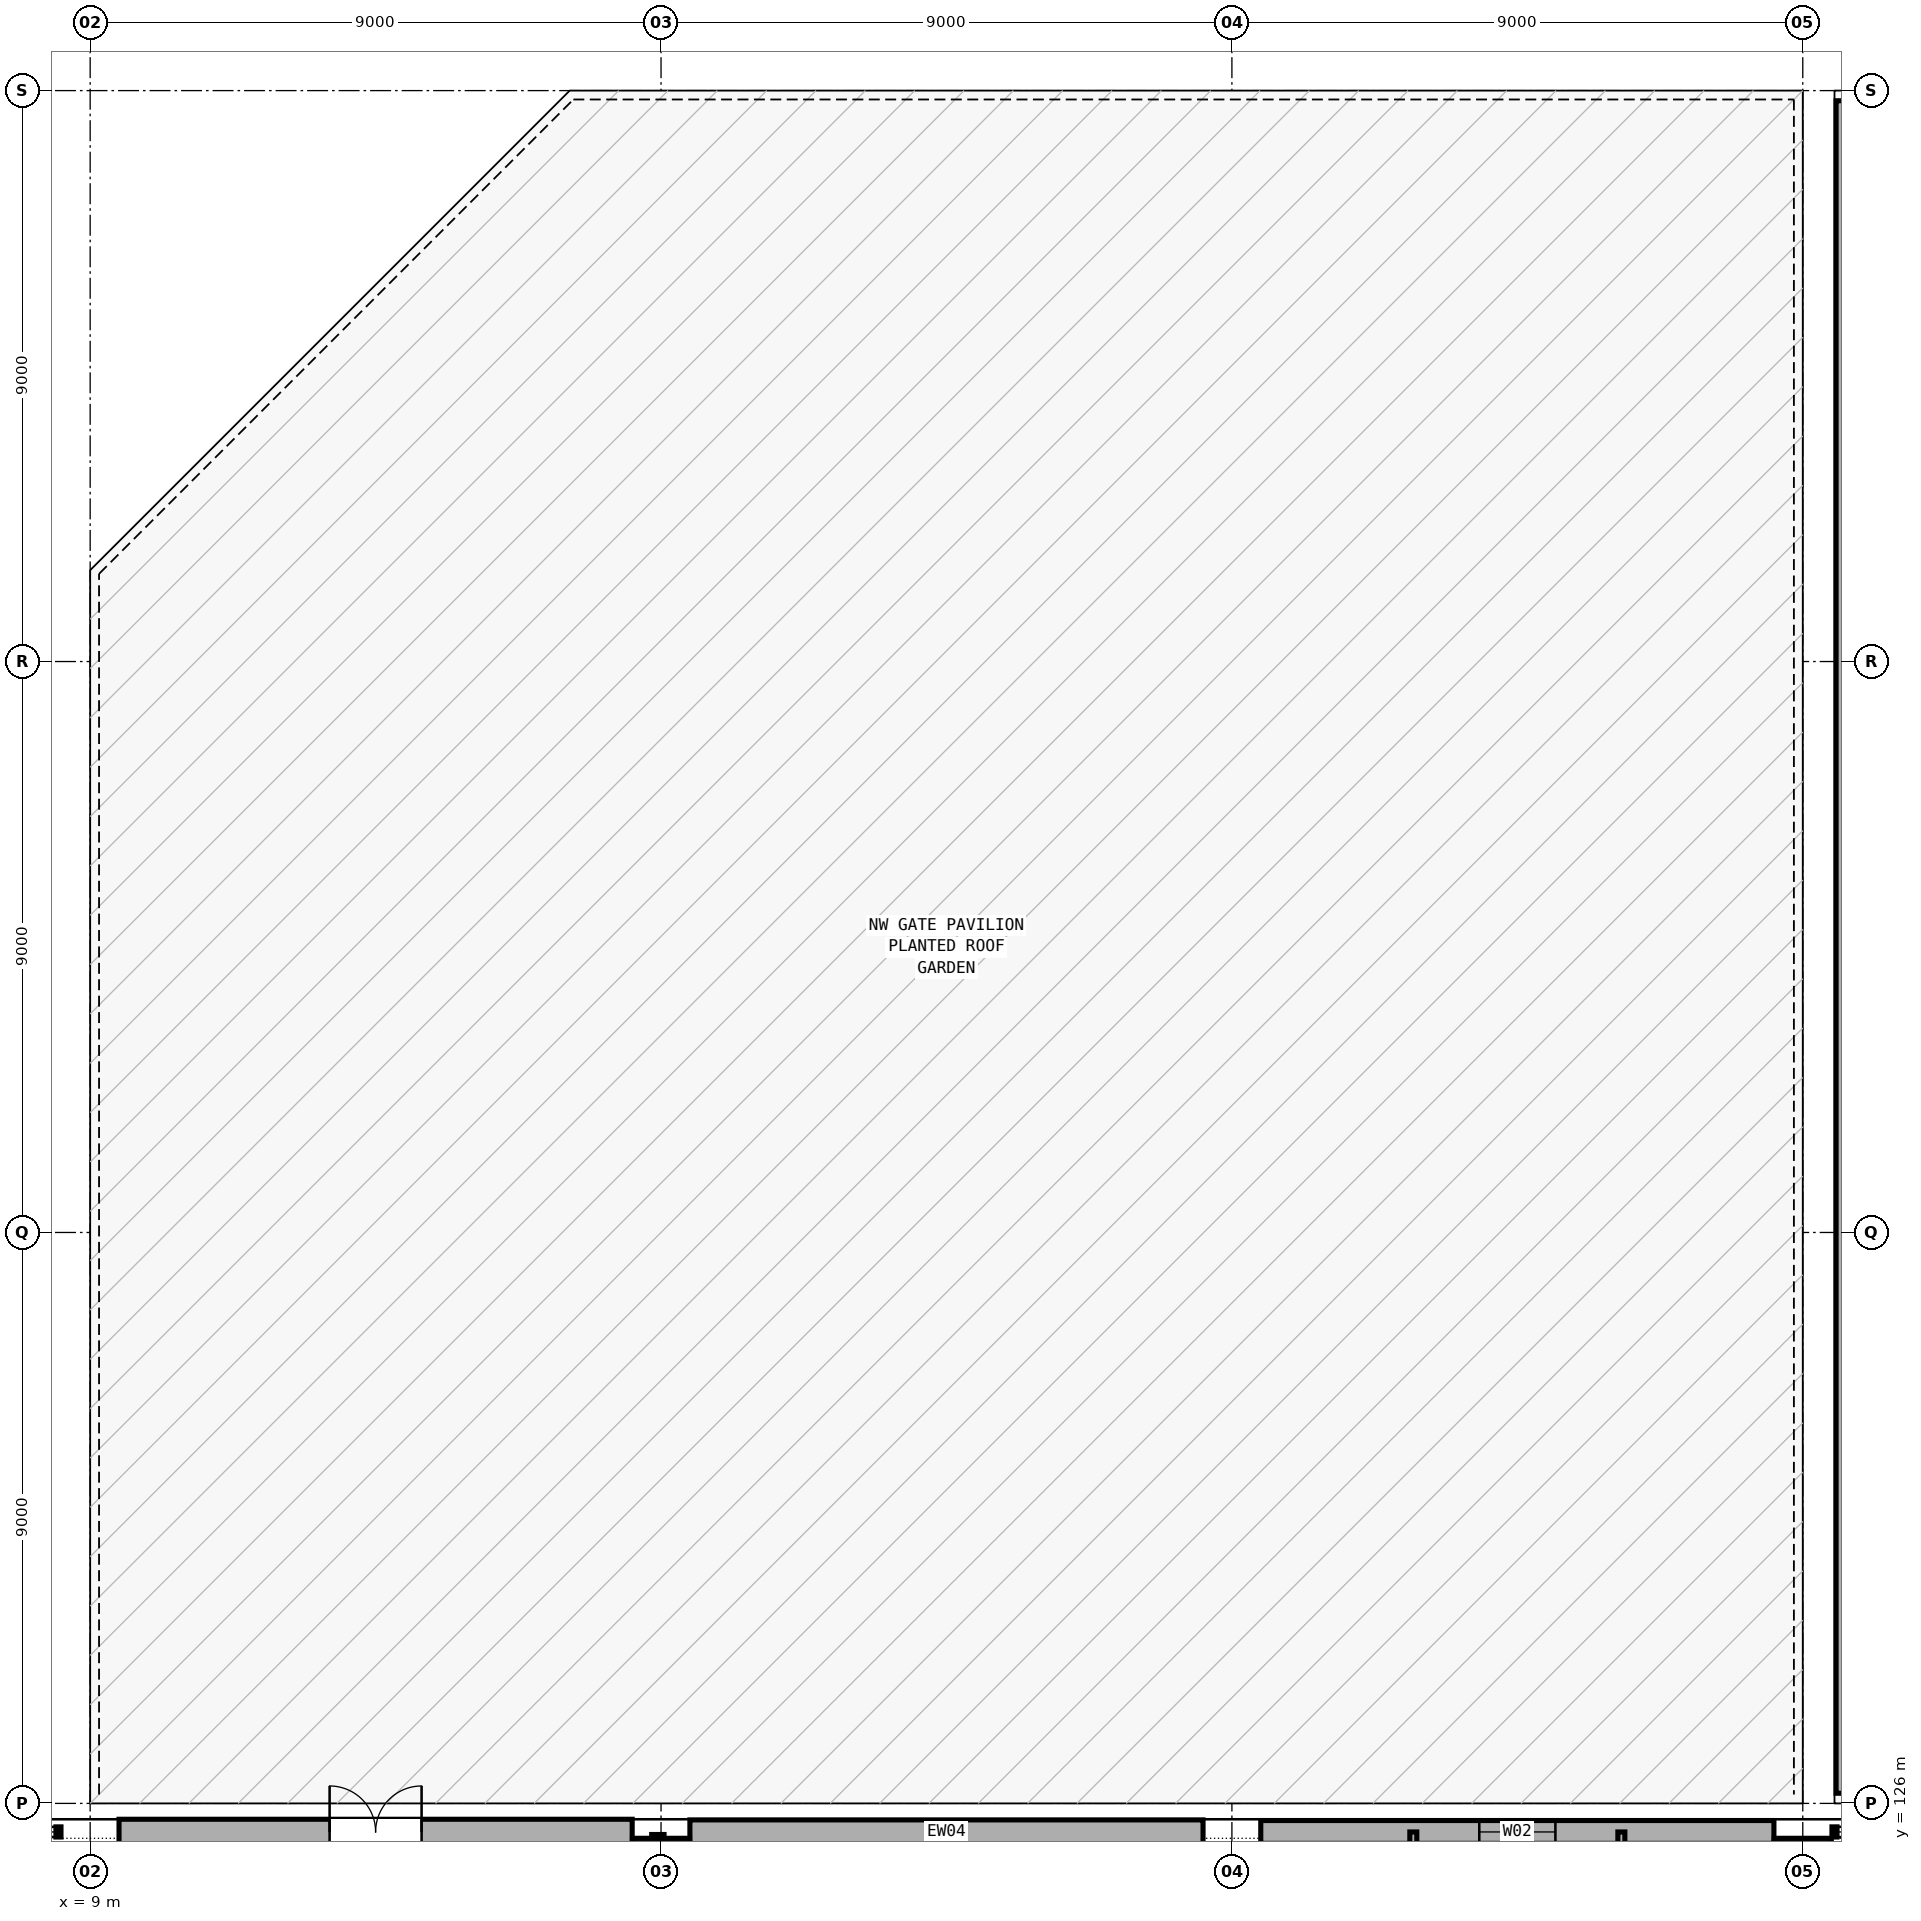
"""IFC4 building model, lengths in metres.
Left out: names, types, materials, properties, quantities, classifications, styles, units other than length and angle.
Written with IfcOpenShell. Run it as: python <this file> out.ifc"""

import sys

from ifc_helpers import new_model, si_unit, direction, frame, frame_2d, origin, origin_2d, place, context, subcontext, project, spatial, rectangle, extrude, element, fill, save


model = new_model("IFC4")
c1 = context("Model", 3, precision=1e-05, world=origin(), true_north=direction((0.0, 1.0)))
c2 = subcontext(c1, "Body", "Model", "MODEL_VIEW")
j1 = project(units=[si_unit("LENGTHUNIT", "METRE"), si_unit("PLANEANGLEUNIT", "RADIAN")], contexts=[c1])
p1 = place(None, origin())
s1 = spatial("IfcSite", under=j1, at=p1, CompositionType="ELEMENT")
p2 = place(p1, origin())
s2 = spatial("IfcBuilding", under=s1, at=p2, CompositionType="ELEMENT")
p3 = place(p2, frame((0.0, 0.0, 14.4)))
s3 = spatial("IfcBuildingStorey", under=s2, at=p3, CompositionType="ELEMENT", Elevation=14.4)
for number, where, z_axis, x_axis in (
    (1, (18.0, 124.9, 0.0), (0.0, 0.0, 1.0), (1.0, 0.0, 0.0)),
    (2, (36.0, 124.9, 0.0), (0.0, 0.0, 1.0), (1.0, 0.0, 0.0)),
):
    element("IfcColumn", number, at=place(p3, frame(where, z_axis=z_axis, x_axis=x_axis)), inside=s3, PredefinedType="COLUMN", context=c2, shape_type="SweptSolid", body=[
        extrude(rectangle(XDim=0.9, YDim=1.1, at=origin_2d()), origin(), (0.0, 0.0, 1.0), 4.8),
    ])
p4 = place(p3, frame((9.455, 125.55, 0.0), z_axis=(0.0, 0.0, 1.0), x_axis=(1.0, 0.0, 0.0)))
e3 = element("IfcWall", 3, at=p4, inside=s3, PredefinedType="SOLIDWALL", context=c2, shape_type="SweptSolid", body=[
    extrude(rectangle(XDim=8.09, YDim=0.4, at=frame_2d((4.045, 0.0))), origin(), (0.0, 0.0, 1.0), 3.58),
])
p5 = place(p4, frame((3.32, 0.0, 0.0)))
e4 = element("IfcOpeningElement", 4, at=p5, cuts=e3, PredefinedType="OPENING", context=c2, shape_type="SweptSolid", body=[
    extrude(rectangle(XDim=1.45, YDim=2.15, at=frame_2d((0.725, 1.075))), frame((0.0, 0.21, 0.0), z_axis=(0.0, -1.0, 0.0), x_axis=(1.0, 0.0, 0.0)), (0.0, 0.0, 1.0), 0.42),
])
p6 = place(p3, frame((18.455, 125.55, 0.0), z_axis=(0.0, 0.0, 1.0), x_axis=(1.0, 0.0, 0.0)))
e5 = element("IfcWall", 5, at=p6, inside=s3, PredefinedType="SOLIDWALL", context=c2, shape_type="SweptSolid", body=[
    extrude(rectangle(XDim=8.09, YDim=0.38, at=frame_2d((4.045, 0.0))), origin(), (0.0, 0.0, 1.0), 3.58),
])
p7 = place(p3, frame((27.455, 125.55, 0.0), z_axis=(0.0, 0.0, 1.0), x_axis=(1.0, 0.0, 0.0)))
e6 = element("IfcWall", 6, at=p7, inside=s3, PredefinedType="SOLIDWALL", context=c2, shape_type="SweptSolid", body=[
    extrude(rectangle(XDim=8.09, YDim=0.36, at=frame_2d((4.045, 0.0))), origin(), (0.0, 0.0, 1.0), 3.58),
])
p8 = place(p7, frame((3.445, 0.0, 0.9)))
e7 = element("IfcOpeningElement", 7, at=p8, cuts=e6, PredefinedType="OPENING", context=c2, shape_type="SweptSolid", body=[
    extrude(rectangle(XDim=1.2, YDim=1.45, at=frame_2d((0.6, 0.725))), frame((0.0, 0.19, 0.0), z_axis=(0.0, -1.0, 0.0), x_axis=(1.0, 0.0, 0.0)), (0.0, 0.0, 1.0), 0.38),
])
p9 = place(p3, frame((36.66, 126.16, 0.0), z_axis=(0.0, 0.0, 1.0), x_axis=(0.0, 1.0, 0.0)))
e8 = element("IfcWall", 8, at=p9, inside=s3, PredefinedType="PARAPET", context=c2, shape_type="SweptSolid", body=[
    extrude(rectangle(XDim=26.68, YDim=0.27, at=frame_2d((13.34, 0.0))), origin(), (0.0, 0.0, 1.0), 0.65),
])
p10 = place(p3, frame((17.95, 125.51, 0.0), z_axis=(0.0, 0.0, 1.0), x_axis=(0.0, -1.0, 0.0)))
e9 = element("IfcWall", 9, at=p10, inside=s3, PredefinedType="PARTITIONING", context=c2, shape_type="SweptSolid", body=[
    extrude(rectangle(XDim=16.708, YDim=0.195, at=frame_2d((8.354, 0.0))), origin(), (0.0, 0.0, 1.0), 3.56),
])
p11 = place(p3, frame((29.86, 102.77, 0.0), z_axis=(0.0, 0.0, 1.0), x_axis=(0.0, 1.0, 0.0)))
e10 = element("IfcWall", 10, at=p11, inside=s3, PredefinedType="PARTITIONING", context=c2, shape_type="SweptSolid", body=[
    extrude(rectangle(XDim=22.78, YDim=0.11, at=frame_2d((11.39, 0.0))), origin(), (0.0, 0.0, 1.0), 3.56),
])
p12 = place(p11, frame((10.615, 0.0, 0.0)))
e11 = element("IfcOpeningElement", 11, at=p12, cuts=e10, PredefinedType="OPENING", context=c2, shape_type="SweptSolid", body=[
    extrude(rectangle(XDim=1.55, YDim=2.2, at=frame_2d((0.775, 1.1))), frame((0.0, 0.065, 0.0), z_axis=(0.0, -1.0, 0.0), x_axis=(1.0, 0.0, 0.0)), (0.0, 0.0, 1.0), 0.13),
])
p13 = place(p3, frame((33.14, 125.55, 0.0), z_axis=(0.0, 0.0, 1.0), x_axis=(0.0, -1.0, 0.0)))
e12 = element("IfcWall", 12, at=p13, inside=s3, PredefinedType="PARTITIONING", context=c2, shape_type="SweptSolid", body=[
    extrude(rectangle(XDim=17.892, YDim=0.11, at=frame_2d((8.946, 0.0))), origin(), (0.0, 0.0, 1.0), 3.56),
])
p14 = place(p13, frame((8.171, 0.0, 0.0)))
e13 = element("IfcOpeningElement", 13, at=p14, cuts=e12, PredefinedType="OPENING", context=c2, shape_type="SweptSolid", body=[
    extrude(rectangle(XDim=1.55, YDim=2.2, at=frame_2d((0.775, 1.1))), frame((0.0, 0.065, 0.0), z_axis=(0.0, -1.0, 0.0), x_axis=(1.0, 0.0, 0.0)), (0.0, 0.0, 1.0), 0.13),
])
p15 = place(p8, origin())
e14 = element("IfcWindow", 14, at=p15, inside=s3, PartitioningType="SINGLE_PANEL", PredefinedType="WINDOW", context=c2, shape_type="SweptSolid", body=[
    extrude(rectangle(XDim=1.2, YDim=1.45, at=frame_2d((0.6, 0.725))), frame((0.0, 0.03, 0.0), z_axis=(0.0, -1.0, 0.0), x_axis=(1.0, 0.0, 0.0)), (0.0, 0.0, 1.0), 0.06),
])
fill(e7, e14)
p16 = place(p5, origin())
e15 = element("IfcDoor", 15, at=p16, inside=s3, OperationType="DOUBLE_DOOR_SINGLE_SWING", PredefinedType="DOOR", context=c2, shape_type="SweptSolid", body=[
    extrude(rectangle(XDim=1.45, YDim=2.15, at=frame_2d((0.725, 1.075))), frame((0.0, 0.025, 0.0), z_axis=(0.0, -1.0, 0.0), x_axis=(1.0, 0.0, 0.0)), (0.0, 0.0, 1.0), 0.05),
])
fill(e4, e15)
save(model, sys.argv[1])
